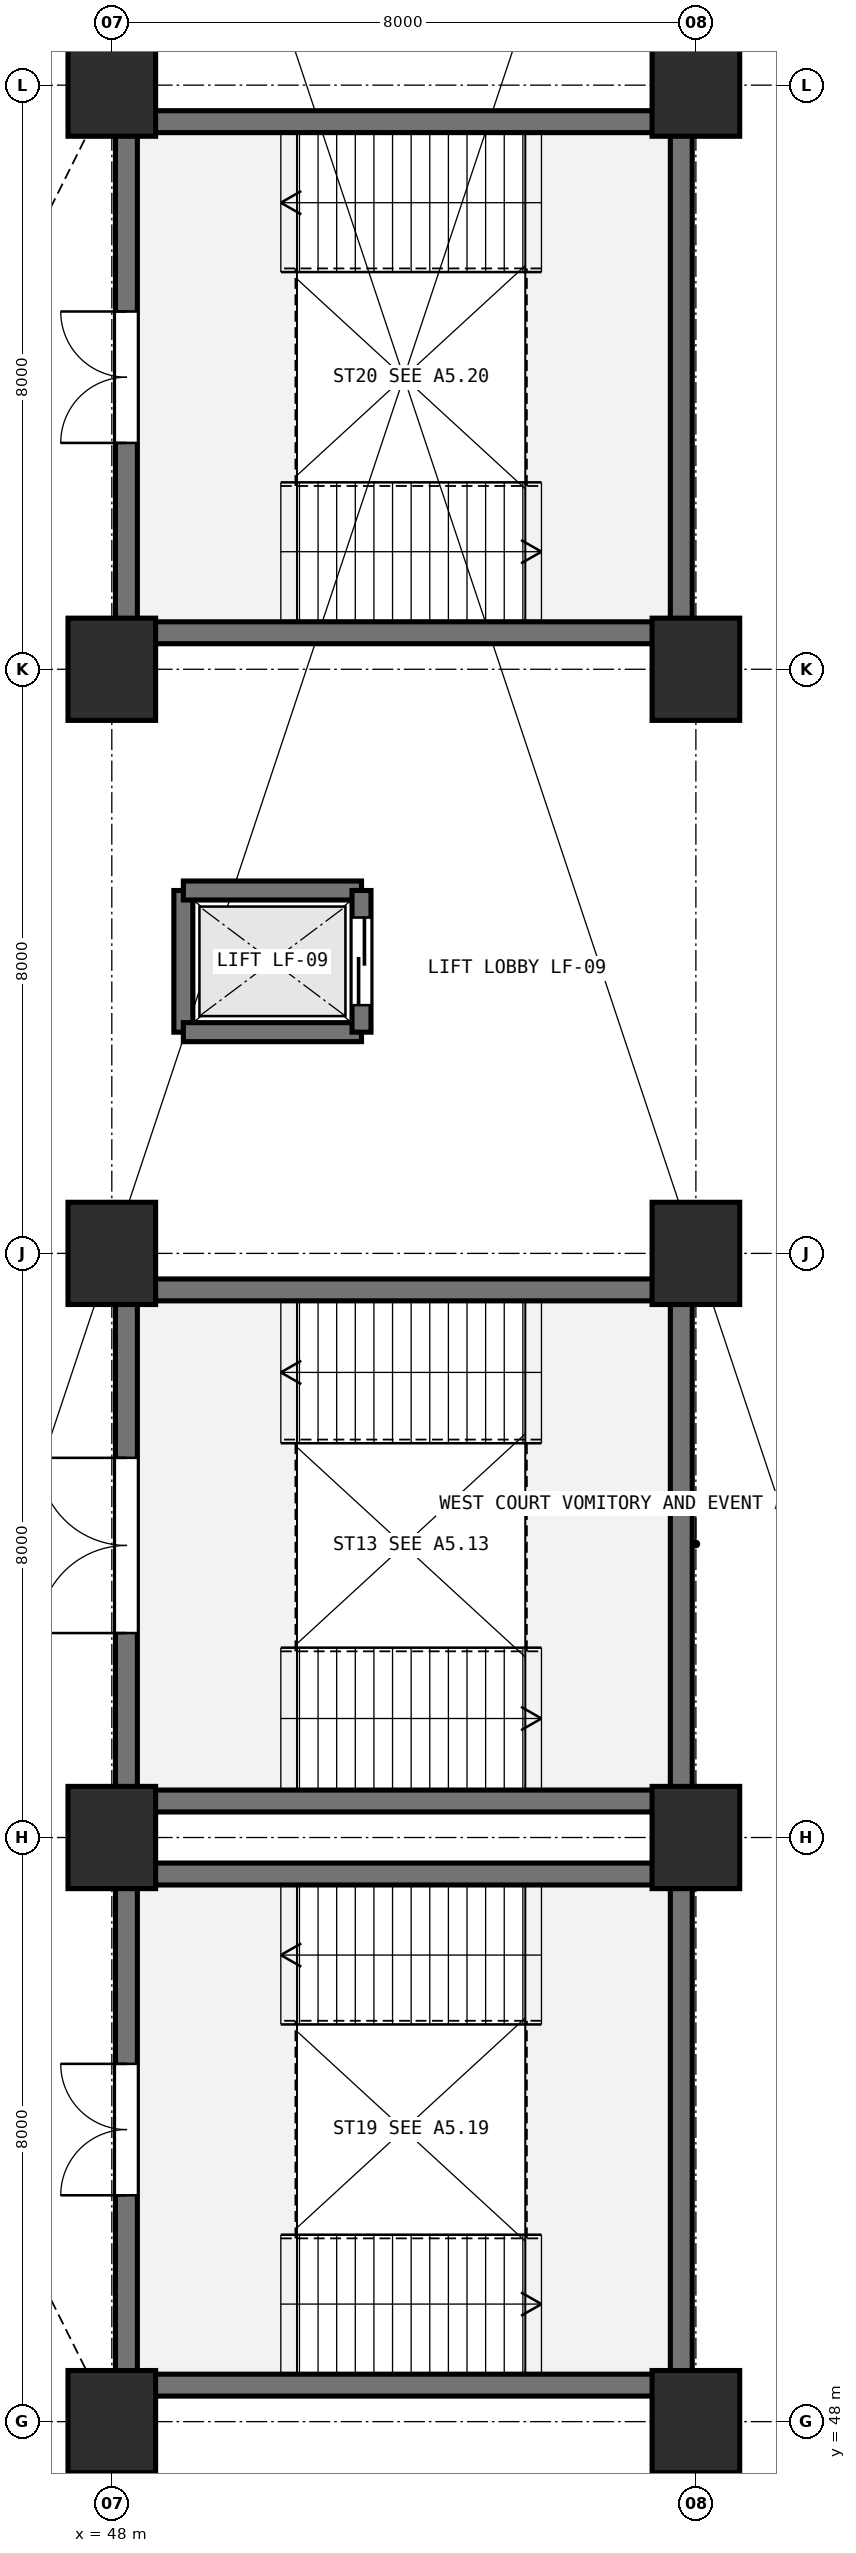
"""IFC4 building model, lengths in metres.
Left out: names, types, materials, properties, quantities, classifications, styles, units other than length and angle.
Written with IfcOpenShell. Run it as: python <this file> out.ifc"""

import sys

from ifc_helpers import new_model, si_unit, direction, frame, frame_2d, origin, origin_2d, place, context, subcontext, project, spatial, rectangle, extrude, element, fill, save


model = new_model("IFC4")
c1 = context("Model", 3, precision=1e-05, world=origin(), true_north=direction((0.0, 1.0)))
c2 = subcontext(c1, "Body", "Model", "MODEL_VIEW")
j1 = project(units=[si_unit("LENGTHUNIT", "METRE"), si_unit("PLANEANGLEUNIT", "RADIAN")], contexts=[c1])
p1 = place(None, origin())
s1 = spatial("IfcSite", under=j1, at=p1, CompositionType="ELEMENT")
p2 = place(p1, origin())
s2 = spatial("IfcBuilding", under=s1, at=p2, CompositionType="ELEMENT")
p3 = place(p2, origin())
s3 = spatial("IfcBuildingStorey", under=s2, at=p3, CompositionType="ELEMENT", Elevation=0.0)
for number, where, z_axis, x_axis in (
    (1, (48.0, 48.0, 0.0), (0.0, 0.0, 1.0), (1.0, 0.0, 0.0)),
    (2, (48.0, 56.0, 0.0), (0.0, 0.0, 1.0), (1.0, 0.0, 0.0)),
    (3, (48.0, 64.0, 0.0), (0.0, 0.0, 1.0), (1.0, 0.0, 0.0)),
    (4, (48.0, 72.0, 0.0), (0.0, 0.0, 1.0), (1.0, 0.0, 0.0)),
    (5, (48.0, 80.0, 0.0), (0.0, 0.0, 1.0), (1.0, 0.0, 0.0)),
    (6, (56.0, 48.0, 0.0), (0.0, 0.0, 1.0), (1.0, 0.0, 0.0)),
    (7, (56.0, 56.0, 0.0), (0.0, 0.0, 1.0), (1.0, 0.0, 0.0)),
    (8, (56.0, 64.0, 0.0), (0.0, 0.0, 1.0), (1.0, 0.0, 0.0)),
    (9, (56.0, 72.0, 0.0), (0.0, 0.0, 1.0), (1.0, 0.0, 0.0)),
    (10, (56.0, 80.0, 0.0), (0.0, 0.0, 1.0), (1.0, 0.0, 0.0)),
):
    element("IfcColumn", number, at=place(p3, frame(where, z_axis=z_axis, x_axis=x_axis)), inside=s3, PredefinedType="COLUMN", context=c2, shape_type="SweptSolid", body=[
        extrude(rectangle(XDim=1.2, YDim=1.4, at=origin_2d()), origin(), (0.0, 0.0, 1.0), 5.4),
    ])
p4 = place(p3, frame((55.8, 56.5, 0.0), z_axis=(0.0, 0.0, 1.0), x_axis=(-1.0, 0.0, 0.0)))
e11 = element("IfcWall", 11, at=p4, inside=s3, PredefinedType="SHEAR", context=c2, shape_type="SweptSolid", body=[
    extrude(rectangle(XDim=7.6, YDim=0.3, at=frame_2d((3.8, 0.0))), origin(), (0.0, 0.0, 1.0), 5.08),
])
p5 = place(p3, frame((48.2, 56.5, 0.0), z_axis=(0.0, 0.0, 1.0), x_axis=(0.0, 1.0, 0.0)))
e12 = element("IfcWall", 12, at=p5, inside=s3, PredefinedType="SHEAR", context=c2, shape_type="SweptSolid", body=[
    extrude(rectangle(XDim=7.0, YDim=0.3, at=frame_2d((3.5, 0.0))), origin(), (0.0, 0.0, 1.0), 5.08),
])
p6 = place(p5, frame((2.3, 0.0, 0.0)))
e13 = element("IfcOpeningElement", 13, at=p6, cuts=e12, PredefinedType="OPENING", context=c2, shape_type="SweptSolid", body=[
    extrude(rectangle(XDim=2.4, YDim=2.2, at=frame_2d((1.2, 1.1))), frame((0.0, 0.16, 0.0), z_axis=(0.0, -1.0, 0.0), x_axis=(1.0, 0.0, 0.0)), (0.0, 0.0, 1.0), 0.32),
])
p7 = place(p3, frame((48.2, 63.5, 0.0), z_axis=(0.0, 0.0, 1.0), x_axis=(1.0, 0.0, 0.0)))
e14 = element("IfcWall", 14, at=p7, inside=s3, PredefinedType="SHEAR", context=c2, shape_type="SweptSolid", body=[
    extrude(rectangle(XDim=7.6, YDim=0.3, at=frame_2d((3.8, 0.0))), origin(), (0.0, 0.0, 1.0), 5.08),
])
p8 = place(p3, frame((55.8, 63.5, 0.0), z_axis=(0.0, 0.0, 1.0), x_axis=(0.0, -1.0, 0.0)))
e15 = element("IfcWall", 15, at=p8, inside=s3, PredefinedType="SHEAR", context=c2, shape_type="SweptSolid", body=[
    extrude(rectangle(XDim=7.0, YDim=0.3, at=frame_2d((3.5, 0.0))), origin(), (0.0, 0.0, 1.0), 5.08),
])
p9 = place(p3, frame((55.8, 48.5, 0.0), z_axis=(0.0, 0.0, 1.0), x_axis=(-1.0, 0.0, 0.0)))
e16 = element("IfcWall", 16, at=p9, inside=s3, PredefinedType="SHEAR", context=c2, shape_type="SweptSolid", body=[
    extrude(rectangle(XDim=7.6, YDim=0.3, at=frame_2d((3.8, 0.0))), origin(), (0.0, 0.0, 1.0), 5.08),
])
p10 = place(p3, frame((48.2, 48.5, 0.0), z_axis=(0.0, 0.0, 1.0), x_axis=(0.0, 1.0, 0.0)))
e17 = element("IfcWall", 17, at=p10, inside=s3, PredefinedType="SHEAR", context=c2, shape_type="SweptSolid", body=[
    extrude(rectangle(XDim=7.0, YDim=0.3, at=frame_2d((3.5, 0.0))), origin(), (0.0, 0.0, 1.0), 5.08),
])
p11 = place(p10, frame((2.6, 0.0, 0.0)))
e18 = element("IfcOpeningElement", 18, at=p11, cuts=e17, PredefinedType="OPENING", context=c2, shape_type="SweptSolid", body=[
    extrude(rectangle(XDim=1.8, YDim=2.2, at=frame_2d((0.9, 1.1))), frame((0.0, 0.16, 0.0), z_axis=(0.0, -1.0, 0.0), x_axis=(1.0, 0.0, 0.0)), (0.0, 0.0, 1.0), 0.32),
])
p12 = place(p3, frame((48.2, 55.5, 0.0), z_axis=(0.0, 0.0, 1.0), x_axis=(1.0, 0.0, 0.0)))
e19 = element("IfcWall", 19, at=p12, inside=s3, PredefinedType="SHEAR", context=c2, shape_type="SweptSolid", body=[
    extrude(rectangle(XDim=7.6, YDim=0.3, at=frame_2d((3.8, 0.0))), origin(), (0.0, 0.0, 1.0), 5.08),
])
p13 = place(p3, frame((55.8, 55.5, 0.0), z_axis=(0.0, 0.0, 1.0), x_axis=(0.0, -1.0, 0.0)))
e20 = element("IfcWall", 20, at=p13, inside=s3, PredefinedType="SHEAR", context=c2, shape_type="SweptSolid", body=[
    extrude(rectangle(XDim=7.0, YDim=0.3, at=frame_2d((3.5, 0.0))), origin(), (0.0, 0.0, 1.0), 5.08),
])
p14 = place(p3, frame((55.8, 72.5, 0.0), z_axis=(0.0, 0.0, 1.0), x_axis=(-1.0, 0.0, 0.0)))
e21 = element("IfcWall", 21, at=p14, inside=s3, PredefinedType="SHEAR", context=c2, shape_type="SweptSolid", body=[
    extrude(rectangle(XDim=7.6, YDim=0.3, at=frame_2d((3.8, 0.0))), origin(), (0.0, 0.0, 1.0), 5.08),
])
p15 = place(p3, frame((48.2, 72.5, 0.0), z_axis=(0.0, 0.0, 1.0), x_axis=(0.0, 1.0, 0.0)))
e22 = element("IfcWall", 22, at=p15, inside=s3, PredefinedType="SHEAR", context=c2, shape_type="SweptSolid", body=[
    extrude(rectangle(XDim=7.0, YDim=0.3, at=frame_2d((3.5, 0.0))), origin(), (0.0, 0.0, 1.0), 5.08),
])
p16 = place(p15, frame((2.6, 0.0, 0.0)))
e23 = element("IfcOpeningElement", 23, at=p16, cuts=e22, PredefinedType="OPENING", context=c2, shape_type="SweptSolid", body=[
    extrude(rectangle(XDim=1.8, YDim=2.2, at=frame_2d((0.9, 1.1))), frame((0.0, 0.16, 0.0), z_axis=(0.0, -1.0, 0.0), x_axis=(1.0, 0.0, 0.0)), (0.0, 0.0, 1.0), 0.32),
])
p17 = place(p3, frame((48.2, 79.5, 0.0), z_axis=(0.0, 0.0, 1.0), x_axis=(1.0, 0.0, 0.0)))
e24 = element("IfcWall", 24, at=p17, inside=s3, PredefinedType="SHEAR", context=c2, shape_type="SweptSolid", body=[
    extrude(rectangle(XDim=7.6, YDim=0.3, at=frame_2d((3.8, 0.0))), origin(), (0.0, 0.0, 1.0), 5.08),
])
p18 = place(p3, frame((55.8, 79.5, 0.0), z_axis=(0.0, 0.0, 1.0), x_axis=(0.0, -1.0, 0.0)))
e25 = element("IfcWall", 25, at=p18, inside=s3, PredefinedType="SHEAR", context=c2, shape_type="SweptSolid", body=[
    extrude(rectangle(XDim=7.0, YDim=0.3, at=frame_2d((3.5, 0.0))), origin(), (0.0, 0.0, 1.0), 5.08),
])
p19 = place(p3, frame((48.98, 67.03, 0.0), z_axis=(0.0, 0.0, 1.0), x_axis=(0.0, 1.0, 0.0)))
e26 = element("IfcWall", 26, at=p19, inside=s3, PredefinedType="SHEAR", context=c2, shape_type="SweptSolid", body=[
    extrude(rectangle(XDim=1.94, YDim=0.26, at=frame_2d((0.97, 0.0))), origin(), (0.0, 0.0, 1.0), 5.08),
])
for number, where, z_axis, x_axis in (
    (27, (48.98, 68.97, 0.0), (0.0, 0.0, 1.0), (1.0, 0.0, 0.0)),
    (28, (51.42, 67.03, 0.0), (0.0, 0.0, 1.0), (-1.0, 0.0, 0.0)),
):
    element("IfcWall", number, at=place(p3, frame(where, z_axis=z_axis, x_axis=x_axis)), inside=s3, PredefinedType="SHEAR", context=c2, shape_type="SweptSolid", body=[
        extrude(rectangle(XDim=2.44, YDim=0.26, at=frame_2d((1.22, 0.0))), origin(), (0.0, 0.0, 1.0), 5.08),
    ])
p20 = place(p3, frame((51.42, 68.97, 0.0), z_axis=(0.0, 0.0, 1.0), x_axis=(0.0, -1.0, 0.0)))
e29 = element("IfcWall", 29, at=p20, inside=s3, PredefinedType="SHEAR", context=c2, shape_type="SweptSolid", body=[
    extrude(rectangle(XDim=1.94, YDim=0.26, at=frame_2d((0.97, 0.0))), origin(), (0.0, 0.0, 1.0), 5.08),
])
p21 = place(p20, frame((0.37, 0.0, 0.0)))
e30 = element("IfcOpeningElement", 30, at=p21, cuts=e29, PredefinedType="OPENING", context=c2, shape_type="SweptSolid", body=[
    extrude(rectangle(XDim=1.2, YDim=2.15, at=frame_2d((0.6, 1.075))), frame((0.0, 0.14, 0.0), z_axis=(0.0, -1.0, 0.0), x_axis=(1.0, 0.0, 0.0)), (0.0, 0.0, 1.0), 0.28),
])
p22 = place(p6, origin())
e31 = element("IfcDoor", 31, at=p22, inside=s3, OperationType="DOUBLE_DOOR_SINGLE_SWING", PredefinedType="DOOR", context=c2, shape_type="SweptSolid", body=[
    extrude(rectangle(XDim=2.4, YDim=2.2, at=frame_2d((1.2, 1.1))), frame((0.0, 0.025, 0.0), z_axis=(0.0, -1.0, 0.0), x_axis=(1.0, 0.0, 0.0)), (0.0, 0.0, 1.0), 0.05),
])
fill(e13, e31)
p23 = place(p11, origin())
e32 = element("IfcDoor", 32, at=p23, inside=s3, OperationType="DOUBLE_DOOR_SINGLE_SWING", PredefinedType="DOOR", context=c2, shape_type="SweptSolid", body=[
    extrude(rectangle(XDim=1.8, YDim=2.2, at=frame_2d((0.9, 1.1))), frame((0.0, 0.025, 0.0), z_axis=(0.0, -1.0, 0.0), x_axis=(1.0, 0.0, 0.0)), (0.0, 0.0, 1.0), 0.05),
])
fill(e18, e32)
p24 = place(p16, origin())
e33 = element("IfcDoor", 33, at=p24, inside=s3, OperationType="DOUBLE_DOOR_SINGLE_SWING", PredefinedType="DOOR", context=c2, shape_type="SweptSolid", body=[
    extrude(rectangle(XDim=1.8, YDim=2.2, at=frame_2d((0.9, 1.1))), frame((0.0, 0.025, 0.0), z_axis=(0.0, -1.0, 0.0), x_axis=(1.0, 0.0, 0.0)), (0.0, 0.0, 1.0), 0.05),
])
fill(e23, e33)
p25 = place(p21, origin())
e34 = element("IfcDoor", 34, at=p25, inside=s3, OperationType="SLIDING_TO_LEFT", PredefinedType="DOOR", context=c2, shape_type="SweptSolid", body=[
    extrude(rectangle(XDim=1.2, YDim=2.15, at=frame_2d((0.6, 1.075))), frame((0.0, 0.025, 0.0), z_axis=(0.0, -1.0, 0.0), x_axis=(1.0, 0.0, 0.0)), (0.0, 0.0, 1.0), 0.05),
])
fill(e30, e34)
save(model, sys.argv[1])
